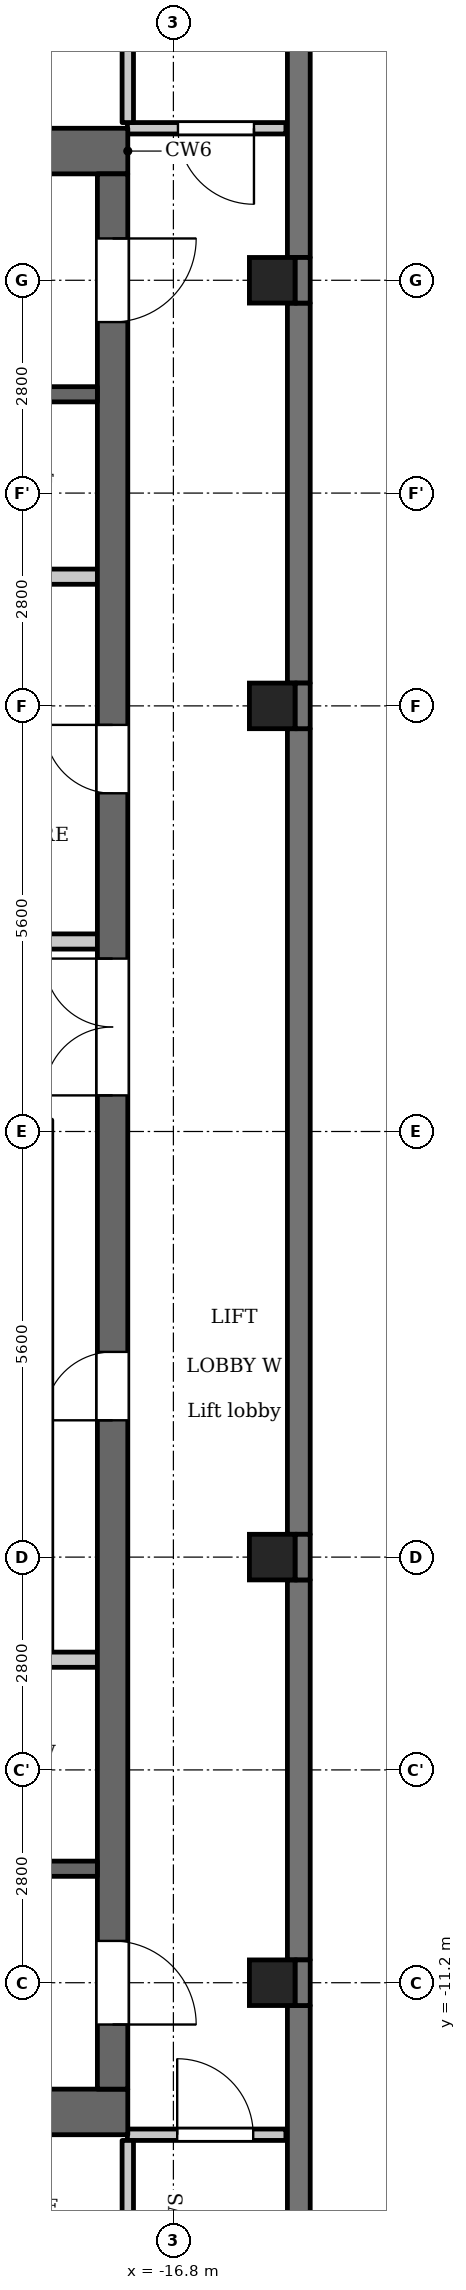
"""IFC4 building model, lengths in metres.
Left out: names, types, materials, properties, quantities, classifications, styles, units other than length and angle.
Written with IfcOpenShell. Run it as: python <this file> out.ifc"""

import sys

from ifc_helpers import new_model, si_unit, direction, frame, frame_2d, origin, origin_2d, place, context, subcontext, project, spatial, polyline, rectangle, outline, extrude, element, fill, save


model = new_model("IFC4")
c1 = context("Model", 3, precision=1e-05, world=origin(), true_north=direction((0.0, 1.0)))
c2 = subcontext(c1, "Body", "Model", "MODEL_VIEW")
j1 = project(units=[si_unit("LENGTHUNIT", "METRE"), si_unit("PLANEANGLEUNIT", "RADIAN")], contexts=[c1])
p1 = place(None, origin())
s1 = spatial("IfcSite", under=j1, at=p1, CompositionType="ELEMENT")
p2 = place(p1, origin())
s2 = spatial("IfcBuilding", under=s1, at=p2, CompositionType="ELEMENT")
p3 = place(p2, frame((0.0, 0.0, 317.4)))
s3 = spatial("IfcBuildingStorey", under=s2, at=p3, CompositionType="ELEMENT", Elevation=317.4)
for number, where, z_axis, x_axis in (
    (1, (-15.5, -11.2, 0.0), (0.0, 0.0, 1.0), (1.0, 0.0, 0.0)),
    (2, (-15.5, -5.6, 0.0), (0.0, 0.0, 1.0), (1.0, 0.0, 0.0)),
    (3, (-15.5, 5.6, 0.0), (0.0, 0.0, 1.0), (1.0, 0.0, 0.0)),
    (4, (-15.5, 11.2, 0.0), (0.0, 0.0, 1.0), (1.0, 0.0, 0.0)),
):
    element("IfcColumn", number, at=place(p3, frame(where, z_axis=z_axis, x_axis=x_axis)), inside=s3, PredefinedType="COLUMN", context=c2, shape_type="SweptSolid", body=[
        extrude(rectangle(XDim=0.6, YDim=0.6, at=origin_2d()), origin(), (0.0, 0.0, 1.0), 3.5),
    ])
p4 = place(p3, frame((-15.15, -18.8, 0.0), z_axis=(0.0, 0.0, 1.0), x_axis=(0.0, 1.0, 0.0)))
e5 = element("IfcWall", 5, at=p4, inside=s3, PredefinedType="SOLIDWALL", context=c2, shape_type="SweptSolid", body=[
    extrude(rectangle(XDim=7.3, YDim=0.3, at=frame_2d((3.65, 0.0))), origin(), (0.0, 0.0, 1.0), 3.2),
])
p5 = place(p4, frame((0.962, 0.0, 1.2)))
e6 = element("IfcOpeningElement", 6, at=p5, cuts=e5, PredefinedType="OPENING", context=c2, shape_type="SweptSolid", body=[
    extrude(rectangle(XDim=3.6, YDim=0.95, at=frame_2d((1.8, 0.475))), frame((0.0, 0.16, 0.0), z_axis=(0.0, -1.0, 0.0), x_axis=(1.0, 0.0, 0.0)), (0.0, 0.0, 1.0), 0.32),
])
p6 = place(p3, frame((-15.15, -10.9, 0.0), z_axis=(0.0, 0.0, 1.0), x_axis=(0.0, 1.0, 0.0)))
e7 = element("IfcWall", 7, at=p6, inside=s3, PredefinedType="SOLIDWALL", context=c2, shape_type="SweptSolid", body=[
    extrude(rectangle(XDim=5.0, YDim=0.3, at=frame_2d((2.5, 0.0))), origin(), (0.0, 0.0, 1.0), 3.2),
])
p7 = place(p3, frame((-15.15, -5.3, 0.0), z_axis=(0.0, 0.0, 1.0), x_axis=(0.0, 1.0, 0.0)))
e8 = element("IfcWall", 8, at=p7, inside=s3, PredefinedType="SOLIDWALL", context=c2, shape_type="SweptSolid", body=[
    extrude(rectangle(XDim=10.6, YDim=0.3, at=frame_2d((5.3, 0.0))), origin(), (0.0, 0.0, 1.0), 3.2),
])
p8 = place(p3, frame((-15.15, 5.9, 0.0), z_axis=(0.0, 0.0, 1.0), x_axis=(0.0, 1.0, 0.0)))
e9 = element("IfcWall", 9, at=p8, inside=s3, PredefinedType="SOLIDWALL", context=c2, shape_type="SweptSolid", body=[
    extrude(rectangle(XDim=5.0, YDim=0.3, at=frame_2d((2.5, 0.0))), origin(), (0.0, 0.0, 1.0), 3.2),
])
p9 = place(p3, frame((-15.15, 11.5, 0.0), z_axis=(0.0, 0.0, 1.0), x_axis=(0.0, 1.0, 0.0)))
e10 = element("IfcWall", 10, at=p9, inside=s3, PredefinedType="SOLIDWALL", context=c2, shape_type="SweptSolid", body=[
    extrude(rectangle(XDim=7.3, YDim=0.3, at=frame_2d((3.65, 0.0))), origin(), (0.0, 0.0, 1.0), 3.2),
])
p10 = place(p9, frame((2.738, 0.0, 1.2)))
e11 = element("IfcOpeningElement", 11, at=p10, cuts=e10, PredefinedType="OPENING", context=c2, shape_type="SweptSolid", body=[
    extrude(rectangle(XDim=3.6, YDim=0.95, at=frame_2d((1.8, 0.475))), frame((0.0, 0.16, 0.0), z_axis=(0.0, -1.0, 0.0), x_axis=(1.0, 0.0, 0.0)), (0.0, 0.0, 1.0), 0.32),
])
for number, where, z_axis, x_axis in (
    (12, (-17.4, 12.9, 0.0), (0.0, 0.0, 1.0), (-1.0, 0.0, 0.0)),
    (13, (-17.4, -12.9, 0.0), (0.0, 0.0, 1.0), (-1.0, 0.0, 0.0)),
):
    element("IfcWall", number, at=place(p3, frame(where, z_axis=z_axis, x_axis=x_axis)), inside=s3, PredefinedType="SHEAR", context=c2, shape_type="SweptSolid", body=[
        extrude(rectangle(XDim=7.6, YDim=0.6, at=frame_2d((3.8, 0.0))), origin(), (0.0, 0.0, 1.0), 3.2),
    ])
p11 = place(p3, frame((-17.6, -12.6, 0.0), z_axis=(0.0, 0.0, 1.0), x_axis=(0.0, 1.0, 0.0)))
e14 = element("IfcWall", 14, at=p11, inside=s3, PredefinedType="SHEAR", context=c2, shape_type="SweptSolid", body=[
    extrude(rectangle(XDim=25.2, YDim=0.4, at=frame_2d((12.6, 0.0))), origin(), (0.0, 0.0, 1.0), 3.2),
])
p12 = place(p11, frame((8.8, 0.0, 0.0)))
e15 = element("IfcOpeningElement", 15, at=p12, cuts=e14, PredefinedType="OPENING", context=c2, shape_type="SweptSolid", body=[
    extrude(rectangle(XDim=0.9, YDim=2.1, at=frame_2d((0.45, 1.05))), frame((0.0, 0.21, 0.0), z_axis=(0.0, -1.0, 0.0), x_axis=(1.0, 0.0, 0.0)), (0.0, 0.0, 1.0), 0.42),
])
p13 = place(p11, frame((17.05, 0.0, 0.0)))
e16 = element("IfcOpeningElement", 16, at=p13, cuts=e14, PredefinedType="OPENING", context=c2, shape_type="SweptSolid", body=[
    extrude(rectangle(XDim=0.9, YDim=2.1, at=frame_2d((0.45, 1.05))), frame((0.0, 0.21, 0.0), z_axis=(0.0, -1.0, 0.0), x_axis=(1.0, 0.0, 0.0)), (0.0, 0.0, 1.0), 0.42),
])
p14 = place(p11, frame((23.25, 0.0, 0.0)))
e17 = element("IfcOpeningElement", 17, at=p14, cuts=e14, PredefinedType="OPENING", context=c2, shape_type="SweptSolid", body=[
    extrude(rectangle(XDim=1.1, YDim=2.1, at=frame_2d((0.55, 1.05))), frame((0.0, 0.21, 0.0), z_axis=(0.0, -1.0, 0.0), x_axis=(1.0, 0.0, 0.0)), (0.0, 0.0, 1.0), 0.42),
])
p15 = place(p11, frame((0.85, 0.0, 0.0)))
e18 = element("IfcOpeningElement", 18, at=p15, cuts=e14, PredefinedType="OPENING", context=c2, shape_type="SweptSolid", body=[
    extrude(rectangle(XDim=1.1, YDim=2.1, at=frame_2d((0.55, 1.05))), frame((0.0, 0.21, 0.0), z_axis=(0.0, -1.0, 0.0), x_axis=(1.0, 0.0, 0.0)), (0.0, 0.0, 1.0), 0.42),
])
p16 = place(p11, frame((13.075, 0.0, 0.0)))
e19 = element("IfcOpeningElement", 19, at=p16, cuts=e14, PredefinedType="OPENING", context=c2, shape_type="SweptSolid", body=[
    extrude(rectangle(XDim=1.8, YDim=2.1, at=frame_2d((0.9, 1.05))), frame((0.0, 0.21, 0.0), z_axis=(0.0, -1.0, 0.0), x_axis=(1.0, 0.0, 0.0)), (0.0, 0.0, 1.0), 0.42),
])
p17 = place(p3, frame((-17.8, -9.7, 0.0), z_axis=(0.0, 0.0, 1.0), x_axis=(-1.0, 0.0, 0.0)))
e20 = element("IfcWall", 20, at=p17, inside=s3, PredefinedType="SHEAR", context=c2, shape_type="SweptSolid", body=[
    extrude(rectangle(XDim=5.8, YDim=0.2, at=frame_2d((2.9, 0.0))), origin(), (0.0, 0.0, 1.0), 3.2),
])
p18 = place(p17, frame((0.85, 0.0, 0.0)))
e21 = element("IfcOpeningElement", 21, at=p18, cuts=e20, PredefinedType="OPENING", context=c2, shape_type="SweptSolid", body=[
    extrude(rectangle(XDim=1.1, YDim=2.1, at=frame_2d((0.55, 1.05))), frame((0.0, 0.11, 0.0), z_axis=(0.0, -1.0, 0.0), x_axis=(1.0, 0.0, 0.0)), (0.0, 0.0, 1.0), 0.22),
])
p19 = place(p17, frame((3.75, 0.0, 0.0)))
e22 = element("IfcOpeningElement", 22, at=p19, cuts=e20, PredefinedType="OPENING", context=c2, shape_type="SweptSolid", body=[
    extrude(rectangle(XDim=1.1, YDim=2.1, at=frame_2d((0.55, 1.05))), frame((0.0, 0.11, 0.0), z_axis=(0.0, -1.0, 0.0), x_axis=(1.0, 0.0, 0.0)), (0.0, 0.0, 1.0), 0.22),
])
p20 = place(p3, frame((-17.8, -6.95, 0.0), z_axis=(0.0, 0.0, 1.0), x_axis=(-1.0, 0.0, 0.0)))
e23 = element("IfcWall", 23, at=p20, inside=s3, PredefinedType="PARTITIONING", context=c2, shape_type="SweptSolid", body=[
    extrude(rectangle(XDim=2.8, YDim=0.2, at=frame_2d((1.4, 0.0))), origin(), (0.0, 0.0, 1.0), 3.2),
])
p21 = place(p3, frame((-17.8, 2.5, 0.0), z_axis=(0.0, 0.0, 1.0), x_axis=(-1.0, 0.0, 0.0)))
e24 = element("IfcWall", 24, at=p21, inside=s3, PredefinedType="PARTITIONING", context=c2, shape_type="SweptSolid", body=[
    extrude(rectangle(XDim=3.0, YDim=0.2, at=frame_2d((1.5, 0.0))), origin(), (0.0, 0.0, 1.0), 3.2),
])
p22 = place(p3, frame((-17.8, 7.3, 0.0), z_axis=(0.0, 0.0, 1.0), x_axis=(-1.0, 0.0, 0.0)))
e25 = element("IfcWall", 25, at=p22, inside=s3, PredefinedType="PARTITIONING", context=c2, shape_type="SweptSolid", body=[
    extrude(rectangle(XDim=2.8, YDim=0.2, at=frame_2d((1.4, 0.0))), origin(), (0.0, 0.0, 1.0), 3.2),
])
p23 = place(p3, frame((-17.8, 9.7, 0.0), z_axis=(0.0, 0.0, 1.0), x_axis=(-1.0, 0.0, 0.0)))
e26 = element("IfcWall", 26, at=p23, inside=s3, PredefinedType="SHEAR", context=c2, shape_type="SweptSolid", body=[
    extrude(rectangle(XDim=5.8, YDim=0.2, at=frame_2d((2.9, 0.0))), origin(), (0.0, 0.0, 1.0), 3.2),
])
p24 = place(p23, frame((0.85, 0.0, 0.0)))
e27 = element("IfcOpeningElement", 27, at=p24, cuts=e26, PredefinedType="OPENING", context=c2, shape_type="SweptSolid", body=[
    extrude(rectangle(XDim=1.1, YDim=2.1, at=frame_2d((0.55, 1.05))), frame((0.0, 0.11, 0.0), z_axis=(0.0, -1.0, 0.0), x_axis=(1.0, 0.0, 0.0)), (0.0, 0.0, 1.0), 0.22),
])
p25 = place(p23, frame((3.75, 0.0, 0.0)))
e28 = element("IfcOpeningElement", 28, at=p25, cuts=e26, PredefinedType="OPENING", context=c2, shape_type="SweptSolid", body=[
    extrude(rectangle(XDim=1.1, YDim=2.1, at=frame_2d((0.55, 1.05))), frame((0.0, 0.11, 0.0), z_axis=(0.0, -1.0, 0.0), x_axis=(1.0, 0.0, 0.0)), (0.0, 0.0, 1.0), 0.22),
])
p26 = place(p3, frame((-17.405, -13.2, 0.0), z_axis=(0.0, 0.0, 1.0), x_axis=(1.0, 0.0, 0.0)))
e29 = element("IfcWall", 29, at=p26, inside=s3, PredefinedType="PARTITIONING", context=c2, shape_type="SweptSolid", body=[
    extrude(rectangle(XDim=2.085, YDim=0.15, at=frame_2d((1.042, 0.0))), origin(), (0.0, 0.0, 1.0), 3.2),
])
p27 = place(p26, frame((0.655, 0.0, 0.0)))
e30 = element("IfcOpeningElement", 30, at=p27, cuts=e29, PredefinedType="OPENING", context=c2, shape_type="SweptSolid", body=[
    extrude(rectangle(XDim=1.0, YDim=2.1, at=frame_2d((0.5, 1.05))), frame((0.0, 0.085, 0.0), z_axis=(0.0, -1.0, 0.0), x_axis=(1.0, 0.0, 0.0)), (0.0, 0.0, 1.0), 0.17),
])
p28 = place(p3, frame((-17.405, 13.2, 0.0), z_axis=(0.0, 0.0, 1.0), x_axis=(1.0, 0.0, 0.0)))
e31 = element("IfcWall", 31, at=p28, inside=s3, PredefinedType="PARTITIONING", context=c2, shape_type="SweptSolid", body=[
    extrude(rectangle(XDim=2.085, YDim=0.15, at=frame_2d((1.042, 0.0))), origin(), (0.0, 0.0, 1.0), 3.2),
])
p29 = place(p28, frame((0.665, 0.0, 0.0)))
e32 = element("IfcOpeningElement", 32, at=p29, cuts=e31, PredefinedType="OPENING", context=c2, shape_type="SweptSolid", body=[
    extrude(rectangle(XDim=1.0, YDim=2.1, at=frame_2d((0.5, 1.05))), frame((0.0, 0.085, 0.0), z_axis=(0.0, -1.0, 0.0), x_axis=(1.0, 0.0, 0.0)), (0.0, 0.0, 1.0), 0.17),
])
p30 = place(p3, frame((-17.4, -19.236, 0.0), z_axis=(0.0, 0.0, 1.0), x_axis=(0.0, 1.0, 0.0)))
e33 = element("IfcWall", 33, at=p30, inside=s3, PredefinedType="PARTITIONING", context=c2, shape_type="SweptSolid", body=[
    extrude(rectangle(XDim=5.961, YDim=0.15, at=frame_2d((2.981, 0.0))), origin(), (0.0, 0.0, 1.0), 3.2),
])
p31 = place(p30, frame((0.386, 0.0, 0.0)))
e34 = element("IfcOpeningElement", 34, at=p31, cuts=e33, PredefinedType="OPENING", context=c2, shape_type="SweptSolid", body=[
    extrude(rectangle(XDim=1.0, YDim=2.1, at=frame_2d((0.5, 1.05))), frame((0.0, 0.085, 0.0), z_axis=(0.0, -1.0, 0.0), x_axis=(1.0, 0.0, 0.0)), (0.0, 0.0, 1.0), 0.17),
])
p32 = place(p3, frame((-17.4, 13.275, 0.0), z_axis=(0.0, 0.0, 1.0), x_axis=(0.0, 1.0, 0.0)))
e35 = element("IfcWall", 35, at=p32, inside=s3, PredefinedType="PARTITIONING", context=c2, shape_type="SweptSolid", body=[
    extrude(rectangle(XDim=5.961, YDim=0.15, at=frame_2d((2.981, 0.0))), origin(), (0.0, 0.0, 1.0), 3.2),
])
p33 = place(p32, frame((1.045, 0.0, 0.0)))
e36 = element("IfcOpeningElement", 36, at=p33, cuts=e35, PredefinedType="OPENING", context=c2, shape_type="SweptSolid", body=[
    extrude(rectangle(XDim=1.0, YDim=2.1, at=frame_2d((0.5, 1.05))), frame((0.0, 0.085, 0.0), z_axis=(0.0, -1.0, 0.0), x_axis=(1.0, 0.0, 0.0)), (0.0, 0.0, 1.0), 0.17),
])
p34 = place(p3, origin())
e37 = element("IfcWall", 37, at=p34, inside=s3, PredefinedType="SOLIDWALL", context=c2, shape_type="SweptSolid", body=[
    extrude(outline(polyline([(-15.2, 10.9), (-15.0, 10.9), (-15.0, 11.5), (-15.2, 11.5), (-15.2, 10.9)])), origin(), (0.0, 0.0, 1.0), 3.2),
])
e38 = element("IfcWall", 38, at=p34, inside=s3, PredefinedType="SOLIDWALL", context=c2, shape_type="SweptSolid", body=[
    extrude(outline(polyline([(-15.2, 5.3), (-15.0, 5.3), (-15.0, 5.9), (-15.3, 5.9), (-15.2, 5.9), (-15.2, 5.3)])), origin(), (0.0, 0.0, 1.0), 3.2),
])
e39 = element("IfcWall", 39, at=p34, inside=s3, PredefinedType="SOLIDWALL", context=c2, shape_type="SweptSolid", body=[
    extrude(outline(polyline([(-15.3, -5.9), (-15.0, -5.9), (-15.0, -5.3), (-15.3, -5.3), (-15.2, -5.3), (-15.2, -5.9), (-15.3, -5.9)])), origin(), (0.0, 0.0, 1.0), 3.2),
])
e40 = element("IfcWall", 40, at=p34, inside=s3, PredefinedType="SOLIDWALL", context=c2, shape_type="SweptSolid", body=[
    extrude(outline(polyline([(-15.2, -11.5), (-15.0, -11.5), (-15.0, -10.9), (-15.2, -10.9), (-15.2, -11.5)])), origin(), (0.0, 0.0, 1.0), 3.2),
])
p35 = place(p12, origin())
e41 = element("IfcDoor", 41, at=p35, inside=s3, OperationType="SINGLE_SWING_RIGHT", PredefinedType="DOOR", context=c2, shape_type="SweptSolid", body=[
    extrude(rectangle(XDim=0.9, YDim=2.1, at=frame_2d((0.45, 1.05))), frame((0.0, 0.025, 0.0), z_axis=(0.0, -1.0, 0.0), x_axis=(1.0, 0.0, 0.0)), (0.0, 0.0, 1.0), 0.05),
])
fill(e15, e41)
p36 = place(p13, origin())
e42 = element("IfcDoor", 42, at=p36, inside=s3, OperationType="SINGLE_SWING_LEFT", PredefinedType="DOOR", context=c2, shape_type="SweptSolid", body=[
    extrude(rectangle(XDim=0.9, YDim=2.1, at=frame_2d((0.45, 1.05))), frame((0.0, 0.025, 0.0), z_axis=(0.0, -1.0, 0.0), x_axis=(1.0, 0.0, 0.0)), (0.0, 0.0, 1.0), 0.05),
])
fill(e16, e42)
p37 = place(p14, origin())
e43 = element("IfcDoor", 43, at=p37, inside=s3, OperationType="SINGLE_SWING_RIGHT", PredefinedType="DOOR", context=c2, shape_type="SweptSolid", body=[
    extrude(rectangle(XDim=1.1, YDim=2.1, at=frame_2d((0.55, 1.05))), frame((0.0, 0.025, 0.0), z_axis=(0.0, -1.0, 0.0), x_axis=(1.0, 0.0, 0.0)), (0.0, 0.0, 1.0), 0.05),
])
fill(e17, e43)
p38 = place(p15, origin())
e44 = element("IfcDoor", 44, at=p38, inside=s3, OperationType="SINGLE_SWING_LEFT", PredefinedType="DOOR", context=c2, shape_type="SweptSolid", body=[
    extrude(rectangle(XDim=1.1, YDim=2.1, at=frame_2d((0.55, 1.05))), frame((0.0, 0.025, 0.0), z_axis=(0.0, -1.0, 0.0), x_axis=(1.0, 0.0, 0.0)), (0.0, 0.0, 1.0), 0.05),
])
fill(e18, e44)
p39 = place(p16, origin())
e45 = element("IfcDoor", 45, at=p39, inside=s3, OperationType="DOUBLE_DOOR_SINGLE_SWING", PredefinedType="DOOR", context=c2, shape_type="SweptSolid", body=[
    extrude(rectangle(XDim=1.8, YDim=2.1, at=frame_2d((0.9, 1.05))), frame((0.0, 0.025, 0.0), z_axis=(0.0, -1.0, 0.0), x_axis=(1.0, 0.0, 0.0)), (0.0, 0.0, 1.0), 0.05),
])
fill(e19, e45)
p40 = place(p29, origin())
e46 = element("IfcDoor", 46, at=p40, inside=s3, OperationType="SINGLE_SWING_RIGHT", PredefinedType="DOOR", context=c2, shape_type="SweptSolid", body=[
    extrude(rectangle(XDim=1.0, YDim=2.1, at=frame_2d((0.5, 1.05))), frame((0.0, 0.025, 0.0), z_axis=(0.0, -1.0, 0.0), x_axis=(1.0, 0.0, 0.0)), (0.0, 0.0, 1.0), 0.05),
])
fill(e32, e46)
p41 = place(p27, origin())
e47 = element("IfcDoor", 47, at=p41, inside=s3, OperationType="SINGLE_SWING_RIGHT", PredefinedType="DOOR", context=c2, shape_type="SweptSolid", body=[
    extrude(rectangle(XDim=1.0, YDim=2.1, at=frame_2d((0.5, 1.05))), frame((0.0, 0.025, 0.0), z_axis=(0.0, -1.0, 0.0), x_axis=(1.0, 0.0, 0.0)), (0.0, 0.0, 1.0), 0.05),
])
fill(e30, e47)
save(model, sys.argv[1])
